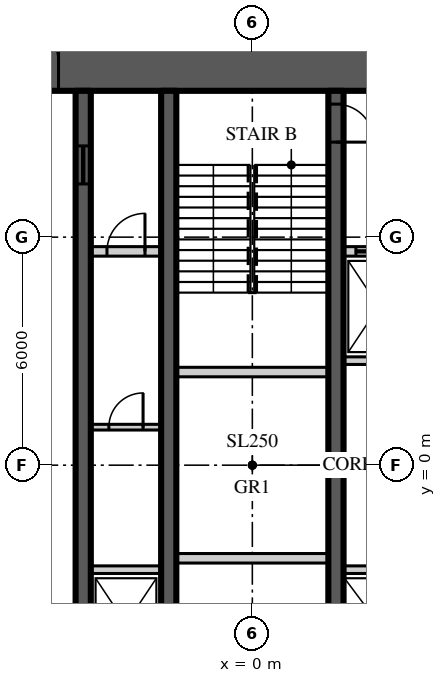
"""IFC4 building model, lengths in metres.
Left out: names, types, materials, properties, quantities, classifications, styles, units other than length and angle.
Written with IfcOpenShell. Run it as: python <this file> out.ifc"""

import sys

from ifc_helpers import new_model, si_unit, direction, frame, frame_2d, origin, place, context, subcontext, project, spatial, rectangle, extrude, element, fill, save


model = new_model("IFC4")
c1 = context("Model", 3, precision=1e-05, world=origin(), true_north=direction((0.0, 1.0)))
c2 = subcontext(c1, "Body", "Model", "MODEL_VIEW")
j1 = project(units=[si_unit("LENGTHUNIT", "METRE"), si_unit("PLANEANGLEUNIT", "RADIAN")], contexts=[c1])
p1 = place(None, origin())
s1 = spatial("IfcSite", under=j1, at=p1, CompositionType="ELEMENT")
p2 = place(p1, origin())
s2 = spatial("IfcBuilding", under=s1, at=p2, CompositionType="ELEMENT")
p3 = place(p2, frame((0.0, 0.0, 33.0)))
s3 = spatial("IfcBuildingStorey", under=s2, at=p3, CompositionType="ELEMENT", Elevation=33.0)
p4 = place(p3, frame((-11.15, 10.5, 0.0), z_axis=(0.0, 0.0, 1.0), x_axis=(1.0, 0.0, 0.0)))
e1 = element("IfcWall", 1, at=p4, inside=s3, PredefinedType="SHEAR", context=c2, shape_type="SweptSolid", body=[
    extrude(rectangle(XDim=22.3, YDim=1.3, at=frame_2d((11.15, 0.0))), origin(), (0.0, 0.0, 1.0), 4.5),
])
p5 = place(p4, frame((4.25, 0.0, 0.0)))
e2 = element("IfcOpeningElement", 2, at=p5, cuts=e1, PredefinedType="OPENING", context=c2, shape_type="SweptSolid", body=[
    extrude(rectangle(XDim=1.8, YDim=2.2, at=frame_2d((0.9, 1.1))), frame((0.0, 0.66, 0.0), z_axis=(0.0, -1.0, 0.0), x_axis=(1.0, 0.0, 0.0)), (0.0, 0.0, 1.0), 1.32),
])
p6 = place(p4, frame((16.25, 0.0, 0.0)))
e3 = element("IfcOpeningElement", 3, at=p6, cuts=e1, PredefinedType="OPENING", context=c2, shape_type="SweptSolid", body=[
    extrude(rectangle(XDim=1.8, YDim=2.2, at=frame_2d((0.9, 1.1))), frame((0.0, 0.66, 0.0), z_axis=(0.0, -1.0, 0.0), x_axis=(1.0, 0.0, 0.0)), (0.0, 0.0, 1.0), 1.32),
])
p7 = place(p3, frame((-4.45, -9.85, 0.0), z_axis=(0.0, 0.0, 1.0), x_axis=(0.0, 1.0, 0.0)))
e4 = element("IfcWall", 4, at=p7, inside=s3, PredefinedType="SHEAR", context=c2, shape_type="SweptSolid", body=[
    extrude(rectangle(XDim=19.7, YDim=0.4, at=frame_2d((9.85, 0.0))), origin(), (0.0, 0.0, 1.0), 4.5),
])
p8 = place(p7, frame((1.95, 0.0, 0.0)))
e5 = element("IfcOpeningElement", 5, at=p8, cuts=e4, PredefinedType="OPENING", context=c2, shape_type="SweptSolid", body=[
    extrude(rectangle(XDim=1.0, YDim=2.2, at=frame_2d((0.5, 1.1))), frame((0.0, 0.21, 0.0), z_axis=(0.0, -1.0, 0.0), x_axis=(1.0, 0.0, 0.0)), (0.0, 0.0, 1.0), 0.42),
])
p9 = place(p7, frame((17.25, 0.0, 0.0)))
e6 = element("IfcOpeningElement", 6, at=p9, cuts=e4, PredefinedType="OPENING", context=c2, shape_type="SweptSolid", body=[
    extrude(rectangle(XDim=1.0, YDim=2.1, at=frame_2d((0.5, 1.05))), frame((0.0, 0.21, 0.0), z_axis=(0.0, -1.0, 0.0), x_axis=(1.0, 0.0, 0.0)), (0.0, 0.0, 1.0), 0.42),
])
p10 = place(p3, frame((-2.2, -9.85, 0.0), z_axis=(0.0, 0.0, 1.0), x_axis=(0.0, 1.0, 0.0)))
e7 = element("IfcWall", 7, at=p10, inside=s3, PredefinedType="SHEAR", context=c2, shape_type="SweptSolid", body=[
    extrude(rectangle(XDim=19.7, YDim=0.4, at=frame_2d((9.85, 0.0))), origin(), (0.0, 0.0, 1.0), 4.5),
])
p11 = place(p10, frame((0.35, 0.0, 0.0)))
e8 = element("IfcOpeningElement", 8, at=p11, cuts=e7, PredefinedType="OPENING", context=c2, shape_type="SweptSolid", body=[
    extrude(rectangle(XDim=1.0, YDim=2.2, at=frame_2d((0.5, 1.1))), frame((0.0, 0.21, 0.0), z_axis=(0.0, -1.0, 0.0), x_axis=(1.0, 0.0, 0.0)), (0.0, 0.0, 1.0), 0.42),
])
p12 = place(p3, frame((2.2, 9.85, 0.0), z_axis=(0.0, 0.0, 1.0), x_axis=(0.0, -1.0, 0.0)))
e9 = element("IfcWall", 9, at=p12, inside=s3, PredefinedType="SHEAR", context=c2, shape_type="SweptSolid", body=[
    extrude(rectangle(XDim=19.7, YDim=0.4, at=frame_2d((9.85, 0.0))), origin(), (0.0, 0.0, 1.0), 4.5),
])
p13 = place(p12, frame((0.35, 0.0, 0.0)))
e10 = element("IfcOpeningElement", 10, at=p13, cuts=e9, PredefinedType="OPENING", context=c2, shape_type="SweptSolid", body=[
    extrude(rectangle(XDim=1.0, YDim=2.2, at=frame_2d((0.5, 1.1))), frame((0.0, 0.21, 0.0), z_axis=(0.0, -1.0, 0.0), x_axis=(1.0, 0.0, 0.0)), (0.0, 0.0, 1.0), 0.42),
])
p14 = place(p3, frame((-4.25, 5.625, 0.0), z_axis=(0.0, 0.0, 1.0), x_axis=(1.0, 0.0, 0.0)))
e11 = element("IfcWall", 11, at=p14, inside=s3, PredefinedType="SOLIDWALL", context=c2, shape_type="SweptSolid", body=[
    extrude(rectangle(XDim=1.85, YDim=0.25, at=frame_2d((0.925, 0.0))), origin(), (0.0, 0.0, 1.0), 4.3),
])
p15 = place(p14, frame((0.425, 0.0, 0.0)))
e12 = element("IfcOpeningElement", 12, at=p15, cuts=e11, PredefinedType="OPENING", context=c2, shape_type="SweptSolid", body=[
    extrude(rectangle(XDim=1.0, YDim=2.2, at=frame_2d((0.5, 1.1))), frame((0.0, 0.135, 0.0), z_axis=(0.0, -1.0, 0.0), x_axis=(1.0, 0.0, 0.0)), (0.0, 0.0, 1.0), 0.27),
])
p16 = place(p3, frame((2.4, 5.625, 0.0), z_axis=(0.0, 0.0, 1.0), x_axis=(1.0, 0.0, 0.0)))
e13 = element("IfcWall", 13, at=p16, inside=s3, PredefinedType="SOLIDWALL", context=c2, shape_type="SweptSolid", body=[
    extrude(rectangle(XDim=1.85, YDim=0.25, at=frame_2d((0.925, 0.0))), origin(), (0.0, 0.0, 1.0), 4.3),
])
p17 = place(p16, frame((0.325, 0.0, 0.0)))
e14 = element("IfcOpeningElement", 14, at=p17, cuts=e13, PredefinedType="OPENING", context=c2, shape_type="SweptSolid", body=[
    extrude(rectangle(XDim=1.2, YDim=2.2, at=frame_2d((0.6, 1.1))), frame((0.0, 0.135, 0.0), z_axis=(0.0, -1.0, 0.0), x_axis=(1.0, 0.0, 0.0)), (0.0, 0.0, 1.0), 0.27),
])
for number, where, z_axis, x_axis in (
    (15, (-2.0, -2.45, 0.0), (0.0, 0.0, 1.0), (1.0, 0.0, 0.0)),
    (16, (-2.0, 2.45, 0.0), (0.0, 0.0, 1.0), (1.0, 0.0, 0.0)),
):
    element("IfcWall", number, at=place(p3, frame(where, z_axis=z_axis, x_axis=x_axis)), inside=s3, PredefinedType="SOLIDWALL", context=c2, shape_type="SweptSolid", body=[
        extrude(rectangle(XDim=4.0, YDim=0.25, at=frame_2d((2.0, 0.0))), origin(), (0.0, 0.0, 1.0), 4.3),
    ])
for number, where, z_axis, x_axis in (
    (17, (-4.25, -2.75, 0.0), (0.0, 0.0, 1.0), (1.0, 0.0, 0.0)),
    (18, (2.4, -2.75, 0.0), (0.0, 0.0, 1.0), (1.0, 0.0, 0.0)),
    (19, (2.4, 2.75, 0.0), (0.0, 0.0, 1.0), (1.0, 0.0, 0.0)),
):
    element("IfcWall", number, at=place(p3, frame(where, z_axis=z_axis, x_axis=x_axis)), inside=s3, PredefinedType="SOLIDWALL", context=c2, shape_type="SweptSolid", body=[
        extrude(rectangle(XDim=1.85, YDim=0.2, at=frame_2d((0.925, 0.0))), origin(), (0.0, 0.0, 1.0), 4.3),
    ])
p18 = place(p3, frame((-4.25, 1.0, 0.0), z_axis=(0.0, 0.0, 1.0), x_axis=(1.0, 0.0, 0.0)))
e20 = element("IfcWall", 20, at=p18, inside=s3, PredefinedType="SOLIDWALL", context=c2, shape_type="SweptSolid", body=[
    extrude(rectangle(XDim=1.85, YDim=0.15, at=frame_2d((0.925, 0.0))), origin(), (0.0, 0.0, 1.0), 4.25),
])
p19 = place(p18, frame((0.475, 0.0, 0.0)))
e21 = element("IfcOpeningElement", 21, at=p19, cuts=e20, PredefinedType="OPENING", context=c2, shape_type="SweptSolid", body=[
    extrude(rectangle(XDim=0.9, YDim=2.1, at=frame_2d((0.45, 1.05))), frame((0.0, 0.085, 0.0), z_axis=(0.0, -1.0, 0.0), x_axis=(1.0, 0.0, 0.0)), (0.0, 0.0, 1.0), 0.17),
])
p20 = place(p5, origin())
e22 = element("IfcDoor", 22, at=p20, inside=s3, OperationType="DOUBLE_DOOR_DOUBLE_SWING", PredefinedType="DOOR", context=c2, shape_type="SweptSolid", body=[
    extrude(rectangle(XDim=1.8, YDim=2.2, at=frame_2d((0.9, 1.1))), frame((0.0, 0.025, 0.0), z_axis=(0.0, -1.0, 0.0), x_axis=(1.0, 0.0, 0.0)), (0.0, 0.0, 1.0), 0.05),
])
fill(e2, e22)
p21 = place(p13, origin())
e23 = element("IfcDoor", 23, at=p21, inside=s3, OperationType="SINGLE_SWING_RIGHT", PredefinedType="DOOR", context=c2, shape_type="SweptSolid", body=[
    extrude(rectangle(XDim=1.0, YDim=2.2, at=frame_2d((0.5, 1.1))), frame((0.0, 0.025, 0.0), z_axis=(0.0, -1.0, 0.0), x_axis=(1.0, 0.0, 0.0)), (0.0, 0.0, 1.0), 0.05),
])
fill(e10, e23)
p22 = place(p9, origin())
e24 = element("IfcDoor", 24, at=p22, inside=s3, OperationType="SLIDING_TO_LEFT", PredefinedType="DOOR", context=c2, shape_type="SweptSolid", body=[
    extrude(rectangle(XDim=1.0, YDim=2.1, at=frame_2d((0.5, 1.05))), frame((0.0, 0.025, 0.0), z_axis=(0.0, -1.0, 0.0), x_axis=(1.0, 0.0, 0.0)), (0.0, 0.0, 1.0), 0.05),
])
fill(e6, e24)
p23 = place(p17, origin())
e25 = element("IfcDoor", 25, at=p23, inside=s3, OperationType="SLIDING_TO_LEFT", PredefinedType="DOOR", context=c2, shape_type="SweptSolid", body=[
    extrude(rectangle(XDim=1.2, YDim=2.2, at=frame_2d((0.6, 1.1))), frame((0.0, 0.025, 0.0), z_axis=(0.0, -1.0, 0.0), x_axis=(1.0, 0.0, 0.0)), (0.0, 0.0, 1.0), 0.05),
])
fill(e14, e25)
p24 = place(p19, origin())
e26 = element("IfcDoor", 26, at=p24, inside=s3, OperationType="SINGLE_SWING_RIGHT", PredefinedType="DOOR", context=c2, shape_type="SweptSolid", body=[
    extrude(rectangle(XDim=0.9, YDim=2.1, at=frame_2d((0.45, 1.05))), frame((0.0, 0.025, 0.0), z_axis=(0.0, -1.0, 0.0), x_axis=(1.0, 0.0, 0.0)), (0.0, 0.0, 1.0), 0.05),
])
fill(e21, e26)
p25 = place(p15, origin())
e27 = element("IfcDoor", 27, at=p25, inside=s3, OperationType="SINGLE_SWING_RIGHT", PredefinedType="DOOR", context=c2, shape_type="SweptSolid", body=[
    extrude(rectangle(XDim=1.0, YDim=2.2, at=frame_2d((0.5, 1.1))), frame((0.0, 0.025, 0.0), z_axis=(0.0, -1.0, 0.0), x_axis=(1.0, 0.0, 0.0)), (0.0, 0.0, 1.0), 0.05),
])
fill(e12, e27)
save(model, sys.argv[1])
